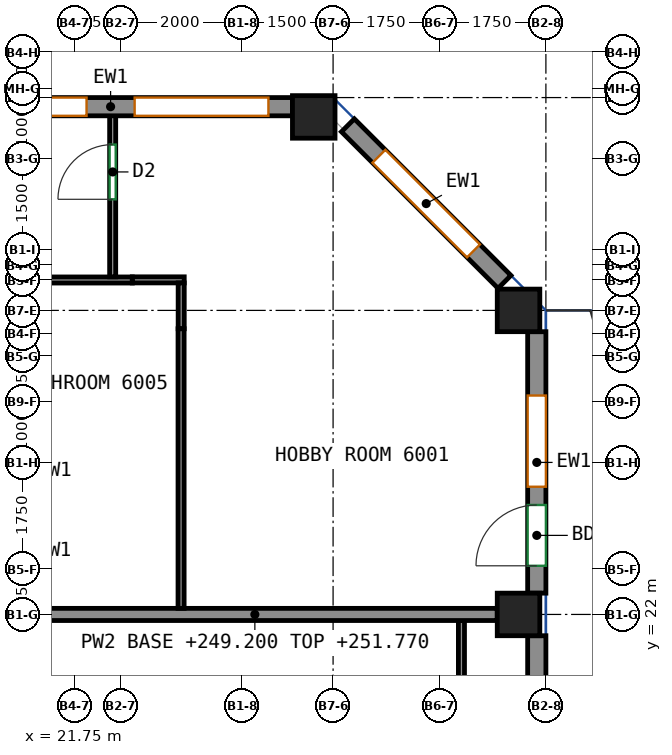
"""IFC4 building model, lengths in metres.
Left out: names, types, materials, properties, quantities, classifications, styles, units other than length and angle.
Written with IfcOpenShell. Run it as: python <this file> out.ifc"""

import sys

from ifc_helpers import new_model, si_unit, direction, frame, frame_2d, origin, origin_2d, place, context, subcontext, project, spatial, rectangle, extrude, source, transform, mapped, element, fill, save


model = new_model("IFC4")
c1 = context("Model", 3, precision=1e-05, world=origin(), true_north=direction((0.0, 1.0)))
c2 = subcontext(c1, "Body", "Model", "MODEL_VIEW")
j1 = project(units=[si_unit("LENGTHUNIT", "METRE"), si_unit("PLANEANGLEUNIT", "RADIAN")], contexts=[c1])
p1 = place(None, origin())
s1 = spatial("IfcSite", under=j1, at=p1, CompositionType="ELEMENT")
p2 = place(p1, origin())
s2 = spatial("IfcBuilding", under=s1, at=p2, CompositionType="ELEMENT")
p3 = place(p2, frame((0.0, 0.0, 249.2)))
s3 = spatial("IfcBuildingStorey", under=s2, at=p3, CompositionType="ELEMENT", Elevation=249.2)
m1 = source(origin(), c2, "Body", "SweptSolid", [
    extrude(rectangle(XDim=0.7, YDim=0.7, at=origin_2d()), origin(), (0.0, 0.0, 1.0), 3.12),
])
for number, where, z_axis, x_axis in (
    (1, (25.682, 30.182, 0.0), (0.0, 0.0, 1.0), (1.0, 0.0, 0.0)),
    (2, (29.05, 22.0, 0.0), (0.0, 0.0, 1.0), (1.0, 0.0, 0.0)),
    (3, (29.05, 27.0, 0.0), (0.0, 0.0, 1.0), (1.0, 0.0, 0.0)),
):
    element("IfcColumn", number, at=place(p3, frame(where, z_axis=z_axis, x_axis=x_axis)), inside=s3, PredefinedType="COLUMN", context=c2, shape_type="MappedRepresentation", body=[
        mapped(m1, transform((0.0, 0.0, 0.0))),
    ])
m2 = source(origin(), c2, "Body", "SweptSolid", [
    extrude(rectangle(XDim=13.3, YDim=0.3, at=frame_2d((6.65, 0.0))), origin(), (0.0, 0.0, 1.0), 3.12),
])
p4 = place(p3, frame((29.35, 8.35, 0.0), z_axis=(0.0, 0.0, 1.0), x_axis=(0.0, 1.0, 0.0)))
e4 = element("IfcWall", 4, at=p4, inside=s3, PredefinedType="SOLIDWALL", context=c2, shape_type="MappedRepresentation", body=[
    mapped(m2, transform((0.0, 0.0, 0.0))),
])
p5 = place(p4, frame((0.913, 0.0, 0.8)))
e5 = element("IfcOpeningElement", 5, at=p5, cuts=e4, PredefinedType="OPENING", context=c2, shape_type="SweptSolid", body=[
    extrude(rectangle(XDim=1.5, YDim=2.05, at=frame_2d((0.75, 1.025))), frame((0.0, 0.16, 0.0), z_axis=(0.0, -1.0, 0.0), x_axis=(1.0, 0.0, 0.0)), (0.0, 0.0, 1.0), 0.32),
])
p6 = place(p4, frame((4.238, 0.0, 0.8)))
e6 = element("IfcOpeningElement", 6, at=p6, cuts=e4, PredefinedType="OPENING", context=c2, shape_type="SweptSolid", body=[
    extrude(rectangle(XDim=1.5, YDim=2.05, at=frame_2d((0.75, 1.025))), frame((0.0, 0.16, 0.0), z_axis=(0.0, -1.0, 0.0), x_axis=(1.0, 0.0, 0.0)), (0.0, 0.0, 1.0), 0.32),
])
p7 = place(p4, frame((7.562, 0.0, 0.8)))
e7 = element("IfcOpeningElement", 7, at=p7, cuts=e4, PredefinedType="OPENING", context=c2, shape_type="SweptSolid", body=[
    extrude(rectangle(XDim=1.5, YDim=2.05, at=frame_2d((0.75, 1.025))), frame((0.0, 0.16, 0.0), z_axis=(0.0, -1.0, 0.0), x_axis=(1.0, 0.0, 0.0)), (0.0, 0.0, 1.0), 0.32),
])
p8 = place(p4, frame((10.887, 0.0, 0.8)))
e8 = element("IfcOpeningElement", 8, at=p8, cuts=e4, PredefinedType="OPENING", context=c2, shape_type="SweptSolid", body=[
    extrude(rectangle(XDim=1.5, YDim=2.05, at=frame_2d((0.75, 1.025))), frame((0.0, 0.16, 0.0), z_axis=(0.0, -1.0, 0.0), x_axis=(1.0, 0.0, 0.0)), (0.0, 0.0, 1.0), 0.32),
])
m3 = source(origin(), c2, "Body", "SweptSolid", [
    extrude(rectangle(XDim=4.3, YDim=0.3, at=frame_2d((2.15, 0.0))), origin(), (0.0, 0.0, 1.0), 3.12),
])
p9 = place(p3, frame((29.35, 22.35, 0.0), z_axis=(0.0, 0.0, 1.0), x_axis=(0.0, 1.0, 0.0)))
e9 = element("IfcWall", 9, at=p9, inside=s3, PredefinedType="SOLIDWALL", context=c2, shape_type="MappedRepresentation", body=[
    mapped(m3, transform((0.0, 0.0, 0.0))),
])
p10 = place(p9, frame((1.75, 0.0, 0.8)))
e10 = element("IfcOpeningElement", 10, at=p10, cuts=e9, PredefinedType="OPENING", context=c2, shape_type="SweptSolid", body=[
    extrude(rectangle(XDim=1.5, YDim=2.05, at=frame_2d((0.75, 1.025))), frame((0.0, 0.16, 0.0), z_axis=(0.0, -1.0, 0.0), x_axis=(1.0, 0.0, 0.0)), (0.0, 0.0, 1.0), 0.32),
])
p11 = place(p9, frame((0.45, 0.0, 0.0)))
e11 = element("IfcOpeningElement", 11, at=p11, cuts=e9, PredefinedType="OPENING", context=c2, shape_type="SweptSolid", body=[
    extrude(rectangle(XDim=1.0, YDim=2.1, at=frame_2d((0.5, 1.05))), frame((0.0, 0.16, 0.0), z_axis=(0.0, -1.0, 0.0), x_axis=(1.0, 0.0, 0.0)), (0.0, 0.0, 1.0), 0.32),
])
m4 = source(origin(), c2, "Body", "SweptSolid", [
    extrude(rectangle(XDim=3.642, YDim=0.3, at=frame_2d((1.821, 0.0))), origin(), (0.0, 0.0, 1.0), 3.12),
])
p12 = place(p3, frame((28.819, 27.469, 0.0), z_axis=(0.0, 0.0, 1.0), x_axis=(-0.707106781187, 0.707106781187, 0.0)))
e12 = element("IfcWall", 12, at=p12, inside=s3, PredefinedType="SOLIDWALL", context=c2, shape_type="MappedRepresentation", body=[
    mapped(m4, transform((0.0, 0.0, 0.0))),
])
p13 = place(p12, frame((0.721, 0.0, 0.8)))
e13 = element("IfcOpeningElement", 13, at=p13, cuts=e12, PredefinedType="OPENING", context=c2, shape_type="SweptSolid", body=[
    extrude(rectangle(XDim=2.2, YDim=2.05, at=frame_2d((1.1, 1.025))), frame((0.0, 0.16, 0.0), z_axis=(0.0, -1.0, 0.0), x_axis=(1.0, 0.0, 0.0)), (0.0, 0.0, 1.0), 0.32),
])
m5 = source(origin(), c2, "Body", "SweptSolid", [
    extrude(rectangle(XDim=5.982, YDim=0.3, at=frame_2d((2.991, 0.0))), origin(), (0.0, 0.0, 1.0), 3.12),
])
p14 = place(p3, frame((25.332, 30.35, 0.0), z_axis=(0.0, 0.0, 1.0), x_axis=(-1.0, 0.0, 0.0)))
e14 = element("IfcWall", 14, at=p14, inside=s3, PredefinedType="SOLIDWALL", context=c2, shape_type="MappedRepresentation", body=[
    mapped(m5, transform((0.0, 0.0, 0.0))),
])
p15 = place(p14, frame((0.396, 0.0, 0.8)))
e15 = element("IfcOpeningElement", 15, at=p15, cuts=e14, PredefinedType="OPENING", context=c2, shape_type="SweptSolid", body=[
    extrude(rectangle(XDim=2.2, YDim=2.05, at=frame_2d((1.1, 1.025))), frame((0.0, 0.16, 0.0), z_axis=(0.0, -1.0, 0.0), x_axis=(1.0, 0.0, 0.0)), (0.0, 0.0, 1.0), 0.32),
])
p16 = place(p14, frame((3.386, 0.0, 0.8)))
e16 = element("IfcOpeningElement", 16, at=p16, cuts=e14, PredefinedType="OPENING", context=c2, shape_type="SweptSolid", body=[
    extrude(rectangle(XDim=2.2, YDim=2.05, at=frame_2d((1.1, 1.025))), frame((0.0, 0.16, 0.0), z_axis=(0.0, -1.0, 0.0), x_axis=(1.0, 0.0, 0.0)), (0.0, 0.0, 1.0), 0.32),
])
p17 = place(p3, frame((28.111, 12.841, 0.0), z_axis=(0.0, 0.0, 1.0), x_axis=(0.0, 1.0, 0.0)))
e17 = element("IfcWall", 17, at=p17, inside=s3, PredefinedType="PARTITIONING", context=c2, shape_type="SweptSolid", body=[
    extrude(rectangle(XDim=9.059, YDim=0.1, at=frame_2d((4.529, 0.0))), origin(), (0.0, 0.0, 1.0), 3.12),
])
p18 = place(p3, frame((20.727, 22.0, 0.0), z_axis=(0.0, 0.0, 1.0), x_axis=(1.0, 0.0, 0.0)))
e18 = element("IfcWall", 18, at=p18, inside=s3, PredefinedType="PARTITIONING", context=c2, shape_type="SweptSolid", body=[
    extrude(rectangle(XDim=7.973, YDim=0.2, at=frame_2d((3.986, 0.0))), origin(), (0.0, 0.0, 1.0), 2.57),
])
p19 = place(p3, frame((4.9, 27.5, 0.0), z_axis=(0.0, 0.0, 1.0), x_axis=(1.0, 0.0, 0.0)))
e19 = element("IfcWall", 19, at=p19, inside=s3, PredefinedType="PARTITIONING", context=c2, shape_type="SweptSolid", body=[
    extrude(rectangle(XDim=17.798, YDim=0.1, at=frame_2d((8.899, 0.0))), origin(), (0.0, 0.0, 1.0), 3.12),
])
p20 = place(p19, frame((8.806, 0.0, 0.0)))
e20 = element("IfcOpeningElement", 20, at=p20, cuts=e19, PredefinedType="OPENING", context=c2, shape_type="SweptSolid", body=[
    extrude(rectangle(XDim=1.0, YDim=2.1, at=frame_2d((0.5, 1.05))), frame((0.0, 0.06, 0.0), z_axis=(0.0, -1.0, 0.0), x_axis=(1.0, 0.0, 0.0)), (0.0, 0.0, 1.0), 0.12),
])
p21 = place(p19, frame((10.897, 0.0, 0.0)))
e21 = element("IfcOpeningElement", 21, at=p21, cuts=e19, PredefinedType="OPENING", context=c2, shape_type="SweptSolid", body=[
    extrude(rectangle(XDim=1.0, YDim=2.1, at=frame_2d((0.5, 1.05))), frame((0.0, 0.06, 0.0), z_axis=(0.0, -1.0, 0.0), x_axis=(1.0, 0.0, 0.0)), (0.0, 0.0, 1.0), 0.12),
])
p22 = place(p3, frame((23.552, 27.502, 0.0), z_axis=(0.0, 0.0, 1.0), x_axis=(-1.0, 0.0, 0.0)))
e22 = element("IfcWall", 22, at=p22, inside=s3, PredefinedType="PARTITIONING", context=c2, shape_type="SweptSolid", body=[
    extrude(rectangle(XDim=0.854, YDim=0.1, at=frame_2d((0.427, 0.0))), origin(), (0.0, 0.0, 1.0), 3.12),
])
p23 = place(p3, frame((23.502, 26.698, 0.0), z_axis=(0.0, 0.0, 1.0), x_axis=(0.0, 1.0, 0.0)))
e23 = element("IfcWall", 23, at=p23, inside=s3, PredefinedType="PARTITIONING", context=c2, shape_type="SweptSolid", body=[
    extrude(rectangle(XDim=0.754, YDim=0.1, at=frame_2d((0.377, 0.0))), origin(), (0.0, 0.0, 1.0), 3.12),
])
p24 = place(p3, frame((23.5, 22.1, 0.0), z_axis=(0.0, 0.0, 1.0), x_axis=(0.0, 1.0, 0.0)))
e24 = element("IfcWall", 24, at=p24, inside=s3, PredefinedType="PARTITIONING", context=c2, shape_type="SweptSolid", body=[
    extrude(rectangle(XDim=4.598, YDim=0.1, at=frame_2d((2.299, 0.0))), origin(), (0.0, 0.0, 1.0), 3.12),
])
p25 = place(p3, frame((22.375, 27.552, 0.0), z_axis=(0.0, 0.0, 1.0), x_axis=(0.0, 1.0, 0.0)))
e25 = element("IfcWall", 25, at=p25, inside=s3, PredefinedType="PARTITIONING", context=c2, shape_type="SweptSolid", body=[
    extrude(rectangle(XDim=2.698, YDim=0.1, at=frame_2d((1.349, 0.0))), origin(), (0.0, 0.0, 1.0), 3.12),
])
p26 = place(p25, frame((1.275, 0.0, 0.0)))
e26 = element("IfcOpeningElement", 26, at=p26, cuts=e25, PredefinedType="OPENING", context=c2, shape_type="SweptSolid", body=[
    extrude(rectangle(XDim=0.9, YDim=2.1, at=frame_2d((0.45, 1.05))), frame((0.0, 0.06, 0.0), z_axis=(0.0, -1.0, 0.0), x_axis=(1.0, 0.0, 0.0)), (0.0, 0.0, 1.0), 0.12),
])
p27 = place(p10, origin())
e27 = element("IfcWindow", 27, at=p27, inside=s3, PartitioningType="SINGLE_PANEL", PredefinedType="WINDOW", context=c2, shape_type="SweptSolid", body=[
    extrude(rectangle(XDim=1.5, YDim=2.05, at=frame_2d((0.75, 1.025))), frame((0.0, 0.03, 0.0), z_axis=(0.0, -1.0, 0.0), x_axis=(1.0, 0.0, 0.0)), (0.0, 0.0, 1.0), 0.06),
])
fill(e10, e27)
p28 = place(p11, origin())
e28 = element("IfcDoor", 28, at=p28, inside=s3, OperationType="SINGLE_SWING_LEFT", PredefinedType="DOOR", context=c2, shape_type="SweptSolid", body=[
    extrude(rectangle(XDim=1.0, YDim=2.1, at=frame_2d((0.5, 1.05))), frame((0.0, 0.025, 0.0), z_axis=(0.0, -1.0, 0.0), x_axis=(1.0, 0.0, 0.0)), (0.0, 0.0, 1.0), 0.05),
])
fill(e11, e28)
p29 = place(p13, origin())
e29 = element("IfcWindow", 29, at=p29, inside=s3, PartitioningType="SINGLE_PANEL", PredefinedType="WINDOW", context=c2, shape_type="SweptSolid", body=[
    extrude(rectangle(XDim=2.2, YDim=2.05, at=frame_2d((1.1, 1.025))), frame((0.0, 0.03, 0.0), z_axis=(0.0, -1.0, 0.0), x_axis=(1.0, 0.0, 0.0)), (0.0, 0.0, 1.0), 0.06),
])
fill(e13, e29)
p30 = place(p15, origin())
e30 = element("IfcWindow", 30, at=p30, inside=s3, PartitioningType="SINGLE_PANEL", PredefinedType="WINDOW", context=c2, shape_type="SweptSolid", body=[
    extrude(rectangle(XDim=2.2, YDim=2.05, at=frame_2d((1.1, 1.025))), frame((0.0, 0.03, 0.0), z_axis=(0.0, -1.0, 0.0), x_axis=(1.0, 0.0, 0.0)), (0.0, 0.0, 1.0), 0.06),
])
fill(e15, e30)
p31 = place(p16, origin())
e31 = element("IfcWindow", 31, at=p31, inside=s3, PartitioningType="SINGLE_PANEL", PredefinedType="WINDOW", context=c2, shape_type="SweptSolid", body=[
    extrude(rectangle(XDim=2.2, YDim=2.05, at=frame_2d((1.1, 1.025))), frame((0.0, 0.03, 0.0), z_axis=(0.0, -1.0, 0.0), x_axis=(1.0, 0.0, 0.0)), (0.0, 0.0, 1.0), 0.06),
])
fill(e16, e31)
p32 = place(p26, origin())
e32 = element("IfcDoor", 32, at=p32, inside=s3, OperationType="SINGLE_SWING_LEFT", PredefinedType="DOOR", context=c2, shape_type="SweptSolid", body=[
    extrude(rectangle(XDim=0.9, YDim=2.1, at=frame_2d((0.45, 1.05))), frame((0.0, 0.025, 0.0), z_axis=(0.0, -1.0, 0.0), x_axis=(1.0, 0.0, 0.0)), (0.0, 0.0, 1.0), 0.05),
])
fill(e26, e32)
save(model, sys.argv[1])
